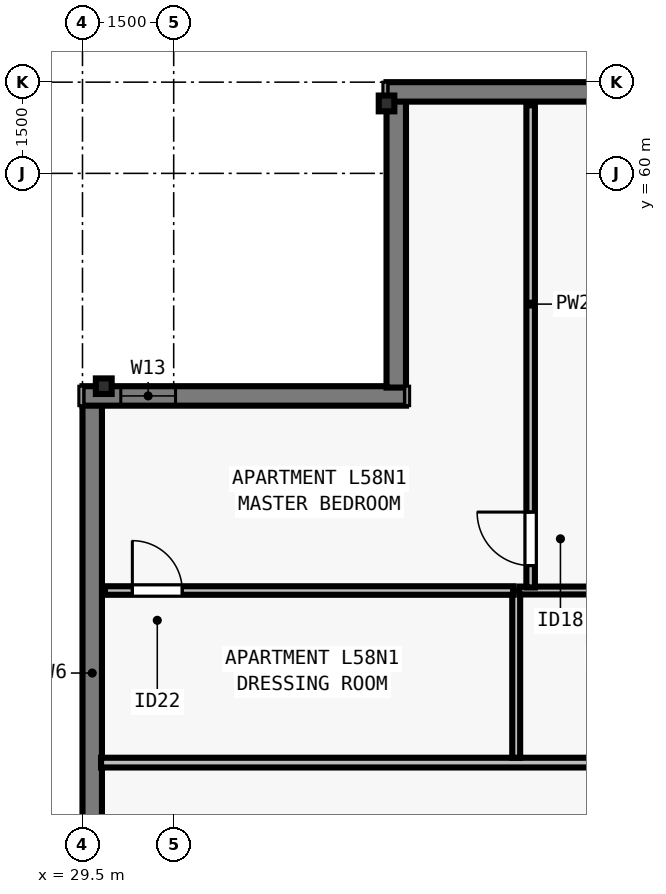
"""IFC4 building model, lengths in metres.
Left out: names, types, materials, properties, quantities, classifications, styles, units other than length and angle.
Written with IfcOpenShell. Run it as: python <this file> out.ifc"""

import sys

from ifc_helpers import new_model, si_unit, direction, frame, frame_2d, origin, origin_2d, place, context, subcontext, project, spatial, rectangle, i_section, extrude, element, fill, save


model = new_model("IFC4")
c1 = context("Model", 3, precision=1e-05, world=origin(), true_north=direction((0.0, 1.0)))
c2 = subcontext(c1, "Body", "Model", "MODEL_VIEW")
j1 = project(units=[si_unit("LENGTHUNIT", "METRE"), si_unit("PLANEANGLEUNIT", "RADIAN")], contexts=[c1])
p1 = place(None, origin())
s1 = spatial("IfcSite", under=j1, at=p1, CompositionType="ELEMENT")
p2 = place(p1, origin())
s2 = spatial("IfcBuilding", under=s1, at=p2, CompositionType="ELEMENT")
p3 = place(p2, frame((0.0, 0.0, 213.0)))
s3 = spatial("IfcBuildingStorey", under=s2, at=p3, CompositionType="ELEMENT", Elevation=213.0)
for number, where, z_axis, x_axis in (
    (1, (34.5, 61.15, 0.0), (0.0, 0.0, 1.0), (1.0, 0.0, 0.0)),
    (2, (29.85, 56.5, 0.0), (0.0, 0.0, 1.0), (0.0, 1.0, 0.0)),
):
    element("IfcColumn", number, at=place(p3, frame(where, z_axis=z_axis, x_axis=x_axis)), inside=s3, PredefinedType="COLUMN", context=c2, shape_type="SweptSolid", body=[
        extrude(i_section(OverallWidth=0.256, OverallDepth=0.26, WebThickness=0.01, FlangeThickness=0.017, FilletRadius=0.013, at=origin_2d()), origin(), (0.0, 0.0, 1.0), 3.5),
    ])
p4 = place(p3, frame((29.66, 21.5, 0.0), z_axis=(0.0, 0.0, 1.0), x_axis=(0.0, 1.0, 0.0)))
e3 = element("IfcWall", 3, at=p4, inside=s3, PredefinedType="SOLIDWALL", context=c2, shape_type="SweptSolid", body=[
    extrude(rectangle(XDim=34.702, YDim=0.32, at=frame_2d((17.351, 0.0))), origin(), (0.0, 0.0, 1.0), 3.29),
])
p5 = place(p4, frame((4.312, 0.0, 0.8)))
e4 = element("IfcOpeningElement", 4, at=p5, cuts=e3, PredefinedType="OPENING", context=c2, shape_type="SweptSolid", body=[
    extrude(rectangle(XDim=1.55, YDim=1.678, at=frame_2d((0.775, 0.839))), frame((0.0, 0.17, 0.0), z_axis=(0.0, -1.0, 0.0), x_axis=(1.0, 0.0, 0.0)), (0.0, 0.0, 1.0), 0.34),
])
p6 = place(p4, frame((6.738, 0.0, 0.8)))
e5 = element("IfcOpeningElement", 5, at=p6, cuts=e3, PredefinedType="OPENING", context=c2, shape_type="SweptSolid", body=[
    extrude(rectangle(XDim=1.85, YDim=1.678, at=frame_2d((0.925, 0.839))), frame((0.0, 0.17, 0.0), z_axis=(0.0, -1.0, 0.0), x_axis=(1.0, 0.0, 0.0)), (0.0, 0.0, 1.0), 0.34),
])
p7 = place(p4, frame((10.263, 0.0, 0.8)))
e6 = element("IfcOpeningElement", 6, at=p7, cuts=e3, PredefinedType="OPENING", context=c2, shape_type="SweptSolid", body=[
    extrude(rectangle(XDim=1.55, YDim=1.678, at=frame_2d((0.775, 0.839))), frame((0.0, 0.17, 0.0), z_axis=(0.0, -1.0, 0.0), x_axis=(1.0, 0.0, 0.0)), (0.0, 0.0, 1.0), 0.34),
])
p8 = place(p4, frame((14.738, 0.0, 0.8)))
e7 = element("IfcOpeningElement", 7, at=p8, cuts=e3, PredefinedType="OPENING", context=c2, shape_type="SweptSolid", body=[
    extrude(rectangle(XDim=1.85, YDim=1.678, at=frame_2d((0.925, 0.839))), frame((0.0, 0.17, 0.0), z_axis=(0.0, -1.0, 0.0), x_axis=(1.0, 0.0, 0.0)), (0.0, 0.0, 1.0), 0.34),
])
p9 = place(p4, frame((18.264, 0.0, 0.8)))
e8 = element("IfcOpeningElement", 8, at=p9, cuts=e3, PredefinedType="OPENING", context=c2, shape_type="SweptSolid", body=[
    extrude(rectangle(XDim=1.55, YDim=1.678, at=frame_2d((0.775, 0.839))), frame((0.0, 0.17, 0.0), z_axis=(0.0, -1.0, 0.0), x_axis=(1.0, 0.0, 0.0)), (0.0, 0.0, 1.0), 0.34),
])
p10 = place(p4, frame((24.164, 0.0, 0.8)))
e9 = element("IfcOpeningElement", 9, at=p10, cuts=e3, PredefinedType="OPENING", context=c2, shape_type="SweptSolid", body=[
    extrude(rectangle(XDim=1.55, YDim=1.678, at=frame_2d((0.775, 0.839))), frame((0.0, 0.17, 0.0), z_axis=(0.0, -1.0, 0.0), x_axis=(1.0, 0.0, 0.0)), (0.0, 0.0, 1.0), 0.34),
])
p11 = place(p3, frame((29.5, 56.34, 0.0), z_axis=(0.0, 0.0, 1.0), x_axis=(1.0, 0.0, 0.0)))
e10 = element("IfcWall", 10, at=p11, inside=s3, PredefinedType="SOLIDWALL", context=c2, shape_type="SweptSolid", body=[
    extrude(rectangle(XDim=5.32, YDim=0.32, at=frame_2d((2.66, 0.0))), origin(), (0.0, 0.0, 1.0), 3.29),
])
p12 = place(p11, frame((0.63, 0.0, 0.8)))
e11 = element("IfcOpeningElement", 11, at=p12, cuts=e10, PredefinedType="OPENING", context=c2, shape_type="SweptSolid", body=[
    extrude(rectangle(XDim=0.9, YDim=1.678, at=frame_2d((0.45, 0.839))), frame((0.0, 0.17, 0.0), z_axis=(0.0, -1.0, 0.0), x_axis=(1.0, 0.0, 0.0)), (0.0, 0.0, 1.0), 0.34),
])
p13 = place(p3, frame((34.66, 56.478, 0.0), z_axis=(0.0, 0.0, 1.0), x_axis=(0.0, 1.0, 0.0)))
e12 = element("IfcWall", 12, at=p13, inside=s3, PredefinedType="SOLIDWALL", context=c2, shape_type="SweptSolid", body=[
    extrude(rectangle(XDim=4.724, YDim=0.32, at=frame_2d((2.362, 0.0))), origin(), (0.0, 0.0, 1.0), 3.29),
])
p14 = place(p3, frame((34.5, 61.34, 0.0), z_axis=(0.0, 0.0, 1.0), x_axis=(1.0, 0.0, 0.0)))
e13 = element("IfcWall", 13, at=p14, inside=s3, PredefinedType="SOLIDWALL", context=c2, shape_type="SweptSolid", body=[
    extrude(rectangle(XDim=14.602, YDim=0.32, at=frame_2d((7.301, 0.0))), origin(), (0.0, 0.0, 1.0), 3.29),
])
p15 = place(p14, frame((5.45, 0.0, 0.8)))
e14 = element("IfcOpeningElement", 14, at=p15, cuts=e13, PredefinedType="OPENING", context=c2, shape_type="SweptSolid", body=[
    extrude(rectangle(XDim=1.55, YDim=1.678, at=frame_2d((0.775, 0.839))), frame((0.0, 0.17, 0.0), z_axis=(0.0, -1.0, 0.0), x_axis=(1.0, 0.0, 0.0)), (0.0, 0.0, 1.0), 0.34),
])
p16 = place(p14, frame((10.052, 0.0, 0.8)))
e15 = element("IfcOpeningElement", 15, at=p16, cuts=e13, PredefinedType="OPENING", context=c2, shape_type="SweptSolid", body=[
    extrude(rectangle(XDim=1.85, YDim=1.678, at=frame_2d((0.925, 0.839))), frame((0.0, 0.17, 0.0), z_axis=(0.0, -1.0, 0.0), x_axis=(1.0, 0.0, 0.0)), (0.0, 0.0, 1.0), 0.34),
])
p17 = place(p3, frame((29.805, 50.31, 0.0), z_axis=(0.0, 0.0, 1.0), x_axis=(1.0, 0.0, 0.0)))
e16 = element("IfcWall", 16, at=p17, inside=s3, PredefinedType="PARTITIONING", context=c2, shape_type="SweptSolid", body=[
    extrude(rectangle(XDim=44.39, YDim=0.16, at=frame_2d((22.195, 0.0))), origin(), (0.0, 0.0, 1.0), 2.958),
])
p18 = place(p17, frame((10.448, 0.0, 0.0)))
e17 = element("IfcOpeningElement", 17, at=p18, cuts=e16, PredefinedType="OPENING", context=c2, shape_type="SweptSolid", body=[
    extrude(rectangle(XDim=0.96, YDim=2.18, at=frame_2d((0.48, 1.09))), frame((0.0, 0.09, 0.0), z_axis=(0.0, -1.0, 0.0), x_axis=(1.0, 0.0, 0.0)), (0.0, 0.0, 1.0), 0.18),
])
p19 = place(p17, frame((32.528, 0.0, 0.0)))
e18 = element("IfcOpeningElement", 18, at=p19, cuts=e16, PredefinedType="OPENING", context=c2, shape_type="SweptSolid", body=[
    extrude(rectangle(XDim=0.96, YDim=2.18, at=frame_2d((0.48, 1.09))), frame((0.0, 0.09, 0.0), z_axis=(0.0, -1.0, 0.0), x_axis=(1.0, 0.0, 0.0)), (0.0, 0.0, 1.0), 0.18),
])
p20 = place(p3, frame((36.633, 50.39, 0.0), z_axis=(0.0, 0.0, 1.0), x_axis=(0.0, 1.0, 0.0)))
e19 = element("IfcWall", 19, at=p20, inside=s3, PredefinedType="PLUMBINGWALL", context=c2, shape_type="SweptSolid", body=[
    extrude(rectangle(XDim=2.75, YDim=0.13, at=frame_2d((1.375, 0.0))), origin(), (0.0, 0.0, 1.0), 3.29),
])
p21 = place(p3, frame((36.683, 53.14, 0.0), z_axis=(0.0, 0.0, 1.0), x_axis=(1.0, 0.0, 0.0)))
e20 = element("IfcWall", 20, at=p21, inside=s3, PredefinedType="PLUMBINGWALL", context=c2, shape_type="SweptSolid", body=[
    extrude(rectangle(XDim=2.85, YDim=0.13, at=frame_2d((1.425, 0.0))), origin(), (0.0, 0.0, 1.0), 3.29),
])
p22 = place(p3, frame((36.87, 53.19, 0.0), z_axis=(0.0, 0.0, 1.0), x_axis=(0.0, 1.0, 0.0)))
e21 = element("IfcWall", 21, at=p22, inside=s3, PredefinedType="PARTITIONING", context=c2, shape_type="SweptSolid", body=[
    extrude(rectangle(XDim=7.93, YDim=0.14, at=frame_2d((3.965, 0.0))), origin(), (0.0, 0.0, 1.0), 2.573),
])
p23 = place(p22, frame((0.36, 0.0, 0.0)))
e22 = element("IfcOpeningElement", 22, at=p23, cuts=e21, PredefinedType="OPENING", context=c2, shape_type="SweptSolid", body=[
    extrude(rectangle(XDim=0.88, YDim=2.1, at=frame_2d((0.44, 1.05))), frame((0.0, 0.08, 0.0), z_axis=(0.0, -1.0, 0.0), x_axis=(1.0, 0.0, 0.0)), (0.0, 0.0, 1.0), 0.16),
])
p24 = place(p3, frame((29.87, 53.14, 0.0), z_axis=(0.0, 0.0, 1.0), x_axis=(1.0, 0.0, 0.0)))
e23 = element("IfcWall", 23, at=p24, inside=s3, PredefinedType="PARTITIONING", context=c2, shape_type="SweptSolid", body=[
    extrude(rectangle(XDim=6.712, YDim=0.14, at=frame_2d((3.356, 0.0))), origin(), (0.0, 0.0, 1.0), 2.958),
])
p25 = place(p24, frame((0.45, 0.0, 0.0)))
e24 = element("IfcOpeningElement", 24, at=p25, cuts=e23, PredefinedType="OPENING", context=c2, shape_type="SweptSolid", body=[
    extrude(rectangle(XDim=0.82, YDim=2.1, at=frame_2d((0.41, 1.05))), frame((0.0, 0.08, 0.0), z_axis=(0.0, -1.0, 0.0), x_axis=(1.0, 0.0, 0.0)), (0.0, 0.0, 1.0), 0.16),
])
p26 = place(p12, origin())
e25 = element("IfcWindow", 25, at=p26, inside=s3, PartitioningType="SINGLE_PANEL", PredefinedType="WINDOW", context=c2, shape_type="SweptSolid", body=[
    extrude(rectangle(XDim=0.9, YDim=1.678, at=frame_2d((0.45, 0.839))), frame((0.0, -0.04, 0.0), z_axis=(0.0, -1.0, 0.0), x_axis=(1.0, 0.0, 0.0)), (0.0, 0.0, 1.0), 0.06),
])
fill(e11, e25)
p27 = place(p25, origin())
e26 = element("IfcDoor", 26, at=p27, inside=s3, OperationType="SINGLE_SWING_LEFT", PredefinedType="DOOR", context=c2, shape_type="SweptSolid", body=[
    extrude(rectangle(XDim=0.82, YDim=2.1, at=frame_2d((0.41, 1.05))), frame((0.0, 0.025, 0.0), z_axis=(0.0, -1.0, 0.0), x_axis=(1.0, 0.0, 0.0)), (0.0, 0.0, 1.0), 0.05),
])
fill(e24, e26)
p28 = place(p23, origin())
e27 = element("IfcDoor", 27, at=p28, inside=s3, OperationType="SINGLE_SWING_RIGHT", PredefinedType="DOOR", context=c2, shape_type="SweptSolid", body=[
    extrude(rectangle(XDim=0.88, YDim=2.1, at=frame_2d((0.44, 1.05))), frame((0.0, 0.025, 0.0), z_axis=(0.0, -1.0, 0.0), x_axis=(1.0, 0.0, 0.0)), (0.0, 0.0, 1.0), 0.05),
])
fill(e22, e27)
save(model, sys.argv[1])
